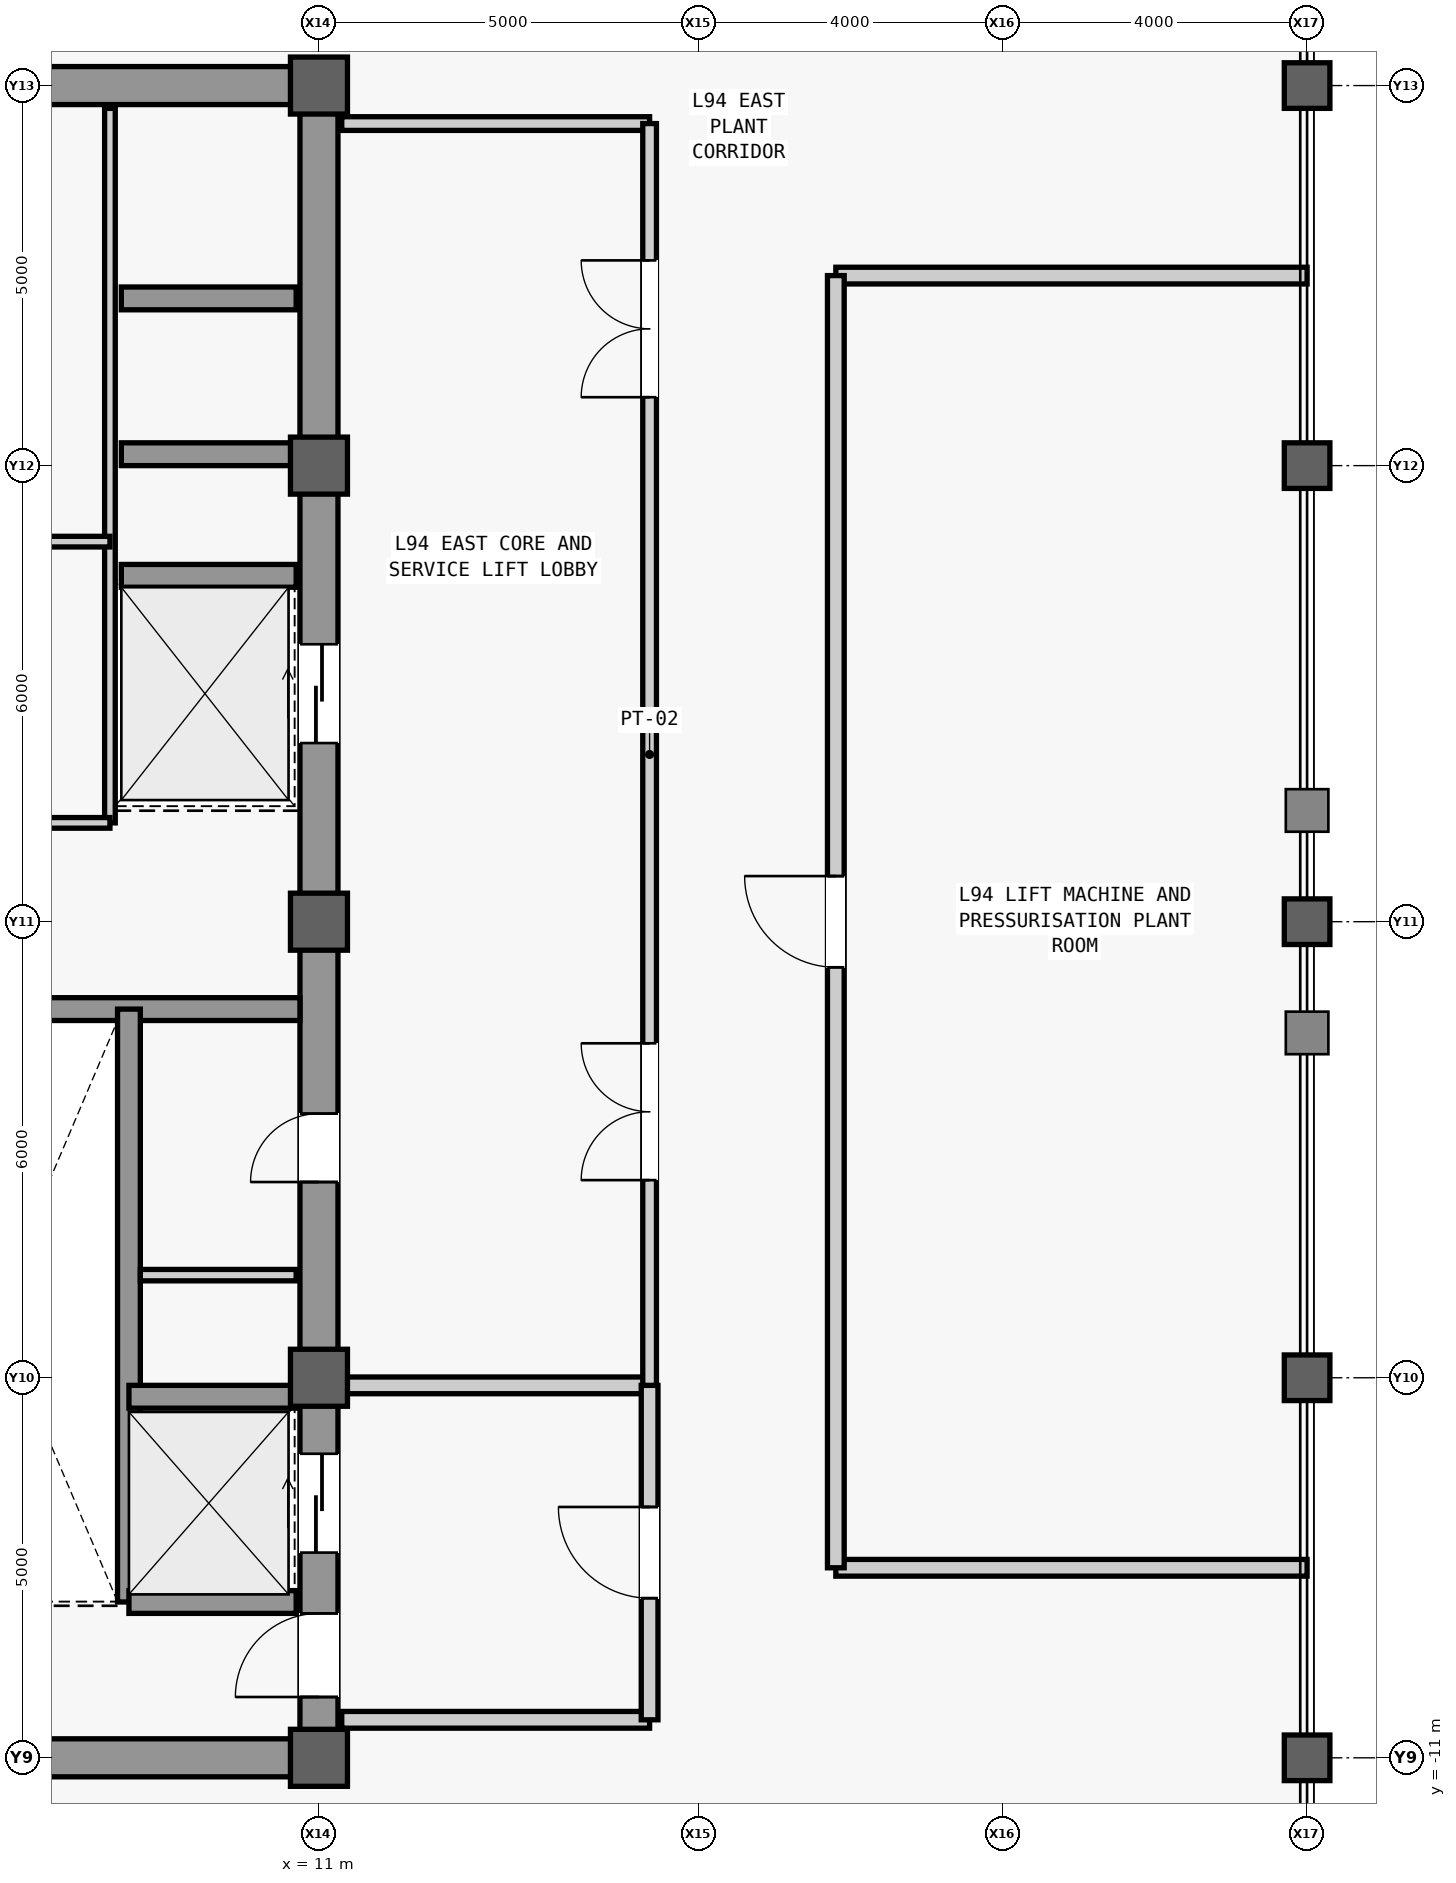
"""IFC4 building model, lengths in metres.
Left out: names, types, materials, properties, quantities, classifications, styles, units other than length and angle.
Written with IfcOpenShell. Run it as: python <this file> out.ifc"""

import sys

from ifc_helpers import new_model, si_unit, direction, frame, frame_2d, origin, origin_2d, place, context, subcontext, project, spatial, rectangle, hollow_rectangle, extrude, source, transform, mapped, element, fill, save


model = new_model("IFC4")
c1 = context("Model", 3, precision=1e-05, world=origin(), true_north=direction((0.0, 1.0)))
c2 = subcontext(c1, "Body", "Model", "MODEL_VIEW")
j1 = project(units=[si_unit("LENGTHUNIT", "METRE"), si_unit("PLANEANGLEUNIT", "RADIAN")], contexts=[c1])
p1 = place(None, origin())
s1 = spatial("IfcSite", under=j1, at=p1, CompositionType="ELEMENT")
p2 = place(p1, origin())
s2 = spatial("IfcBuilding", under=s1, at=p2, CompositionType="ELEMENT")
p3 = place(p2, frame((0.0, 0.0, 399.5)))
s3 = spatial("IfcBuildingStorey", under=s2, at=p3, CompositionType="ELEMENT", Elevation=399.5)
m1 = source(origin(), c2, "Body", "SweptSolid", [
    extrude(rectangle(XDim=22.0, YDim=0.5, at=frame_2d((11.0, 0.0))), origin(), (0.0, 0.0, 1.0), 4.5),
])
p4 = place(p3, frame((11.0, -11.0, 0.0), z_axis=(0.0, 0.0, 1.0), x_axis=(0.0, 1.0, 0.0)))
e1 = element("IfcWall", 1, at=p4, inside=s3, PredefinedType="SHEAR", context=c2, shape_type="MappedRepresentation", body=[
    mapped(m1, transform((0.0, 0.0, 0.0), scale=1.0)),
])
m2 = source(origin(), c2, "Body", "SweptSolid", [
    extrude(rectangle(XDim=1.1, YDim=2.2, at=frame_2d((0.55, 1.1))), frame((0.0, 0.26, 0.0), z_axis=(0.0, -1.0, 0.0), x_axis=(1.0, 0.0, 0.0)), (0.0, 0.0, 1.0), 0.52),
])
p5 = place(p4, frame((0.8, 0.0, 0.0)))
e2 = element("IfcOpeningElement", 2, at=p5, cuts=e1, PredefinedType="OPENING", context=c2, shape_type="MappedRepresentation", body=[
    mapped(m2, transform((0.0, 0.0, 0.0), scale=1.0)),
])
m3 = source(origin(), c2, "Body", "SweptSolid", [
    extrude(rectangle(XDim=0.9, YDim=2.15, at=frame_2d((0.45, 1.075))), frame((0.0, 0.26, 0.0), z_axis=(0.0, -1.0, 0.0), x_axis=(1.0, 0.0, 0.0)), (0.0, 0.0, 1.0), 0.52),
])
p6 = place(p4, frame((7.575, 0.0, 0.0)))
e3 = element("IfcOpeningElement", 3, at=p6, cuts=e1, PredefinedType="OPENING", context=c2, shape_type="MappedRepresentation", body=[
    mapped(m3, transform((0.0, 0.0, 0.0), scale=1.0)),
])
m4 = source(origin(), c2, "Body", "SweptSolid", [
    extrude(rectangle(XDim=1.3, YDim=2.3, at=frame_2d((0.65, 1.15))), frame((0.0, 0.26, 0.0), z_axis=(0.0, -1.0, 0.0), x_axis=(1.0, 0.0, 0.0)), (0.0, 0.0, 1.0), 0.52),
])
p7 = place(p4, frame((2.7, 0.0, 0.0)))
e4 = element("IfcOpeningElement", 4, at=p7, cuts=e1, PredefinedType="OPENING", context=c2, shape_type="MappedRepresentation", body=[
    mapped(m4, transform((0.0, 0.0, 0.0), scale=1.0)),
])
p8 = place(p4, frame((13.35, 0.0, 0.0)))
e5 = element("IfcOpeningElement", 5, at=p8, cuts=e1, PredefinedType="OPENING", context=c2, shape_type="MappedRepresentation", body=[
    mapped(m4, transform((0.0, 0.0, 0.0), scale=1.0)),
])
m5 = source(origin(), c2, "Body", "SweptSolid", [
    extrude(rectangle(XDim=5.9, YDim=0.5, at=frame_2d((2.95, 0.0))), origin(), (0.0, 0.0, 1.0), 4.5),
])
p9 = place(p3, frame((4.85, -11.0, 0.0), z_axis=(0.0, 0.0, 1.0), x_axis=(1.0, 0.0, 0.0)))
e6 = element("IfcWall", 6, at=p9, inside=s3, PredefinedType="SHEAR", context=c2, shape_type="MappedRepresentation", body=[
    mapped(m5, transform((0.0, 0.0, 0.0), scale=1.0)),
])
p10 = place(p3, frame((4.85, 11.0, 0.0), z_axis=(0.0, 0.0, 1.0), x_axis=(1.0, 0.0, 0.0)))
e7 = element("IfcWall", 7, at=p10, inside=s3, PredefinedType="SHEAR", context=c2, shape_type="MappedRepresentation", body=[
    mapped(m5, transform((0.0, 0.0, 0.0), scale=1.0)),
])
p11 = place(p10, frame((0.5, 0.0, 0.0)))
e8 = element("IfcOpeningElement", 8, at=p11, cuts=e7, PredefinedType="OPENING", context=c2, shape_type="MappedRepresentation", body=[
    mapped(m3, transform((0.0, 0.0, 0.0), scale=1.0)),
])
m6 = source(origin(), c2, "Body", "SweptSolid", [
    extrude(rectangle(XDim=5.65, YDim=0.3, at=frame_2d((2.825, 0.0))), origin(), (0.0, 0.0, 1.0), 4.5),
])
p12 = place(p3, frame((5.1, -1.15, 0.0), z_axis=(0.0, 0.0, 1.0), x_axis=(1.0, 0.0, 0.0)))
e9 = element("IfcWall", 9, at=p12, inside=s3, PredefinedType="SHEAR", context=c2, shape_type="MappedRepresentation", body=[
    mapped(m6, transform((0.0, 0.0, 0.0), scale=1.0)),
])
m7 = source(origin(), c2, "Body", "SweptSolid", [
    extrude(rectangle(XDim=0.75, YDim=0.75, at=origin_2d()), origin(), (0.0, 0.0, 1.0), 4.8),
])
for number, where, z_axis, x_axis in (
    (10, (11.0, -11.0, 0.0), (0.0, 0.0, 1.0), (1.0, 0.0, 0.0)),
    (11, (11.0, -6.0, 0.0), (0.0, 0.0, 1.0), (1.0, 0.0, 0.0)),
    (12, (11.0, 0.0, 0.0), (0.0, 0.0, 1.0), (1.0, 0.0, 0.0)),
    (13, (11.0, 6.0, 0.0), (0.0, 0.0, 1.0), (1.0, 0.0, 0.0)),
    (14, (11.0, 11.0, 0.0), (0.0, 0.0, 1.0), (1.0, 0.0, 0.0)),
):
    element("IfcColumn", number, at=place(p3, frame(where, z_axis=z_axis, x_axis=x_axis)), inside=s3, PredefinedType="COLUMN", context=c2, shape_type="MappedRepresentation", body=[
        mapped(m7, transform((0.0, 0.0, 0.0), scale=1.0)),
    ])
m8 = source(origin(), c2, "Body", "SweptSolid", [
    extrude(hollow_rectangle(XDim=0.6, YDim=0.6, WallThickness=0.035, at=origin_2d()), origin(), (0.0, 0.0, 1.0), 4.8),
])
for number, where, z_axis, x_axis in (
    (15, (24.0, -11.0, 0.0), (0.0, 0.0, 1.0), (1.0, 0.0, 0.0)),
    (16, (24.0, -6.0, 0.0), (0.0, 0.0, 1.0), (1.0, 0.0, 0.0)),
    (17, (24.0, 0.0, 0.0), (0.0, 0.0, 1.0), (1.0, 0.0, 0.0)),
    (18, (24.0, 6.0, 0.0), (0.0, 0.0, 1.0), (1.0, 0.0, 0.0)),
    (19, (24.0, 11.0, 0.0), (0.0, 0.0, 1.0), (1.0, 0.0, 0.0)),
):
    element("IfcColumn", number, at=place(p3, frame(where, z_axis=z_axis, x_axis=x_axis)), inside=s3, PredefinedType="COLUMN", context=c2, shape_type="MappedRepresentation", body=[
        mapped(m8, transform((0.0, 0.0, 0.0), scale=1.0)),
    ])
m9 = source(origin(), c2, "Body", "SweptSolid", [
    extrude(rectangle(XDim=7.8, YDim=0.3, at=frame_2d((3.9, 0.0))), origin(), (0.0, 0.0, 1.0), 4.5),
])
p13 = place(p3, frame((8.5, -8.95, 0.0), z_axis=(0.0, 0.0, 1.0), x_axis=(0.0, 1.0, 0.0)))
e20 = element("IfcWall", 20, at=p13, inside=s3, PredefinedType="SHEAR", context=c2, shape_type="MappedRepresentation", body=[
    mapped(m9, transform((0.0, 0.0, 0.0), scale=1.0)),
])
m10 = source(origin(), c2, "Body", "SweptSolid", [
    extrude(rectangle(XDim=2.2, YDim=0.3, at=frame_2d((1.1, 0.0))), origin(), (0.0, 0.0, 1.0), 4.5),
])
for number, where, z_axis, x_axis in (
    (21, (8.5, -8.95, 0.0), (0.0, 0.0, 1.0), (1.0, 0.0, 0.0)),
    (22, (8.5, -6.25, 0.0), (0.0, 0.0, 1.0), (1.0, 0.0, 0.0)),
):
    element("IfcWall", number, at=place(p3, frame(where, z_axis=z_axis, x_axis=x_axis)), inside=s3, PredefinedType="SHEAR", context=c2, shape_type="MappedRepresentation", body=[
        mapped(m10, transform((0.0, 0.0, 0.0), scale=1.0)),
    ])
m11 = source(origin(), c2, "Body", "SweptSolid", [
    extrude(rectangle(XDim=2.3, YDim=0.3, at=frame_2d((1.15, 0.0))), origin(), (0.0, 0.0, 1.0), 4.5),
])
for number, where, z_axis, x_axis in (
    (23, (8.4, 4.55, 0.0), (0.0, 0.0, 1.0), (1.0, 0.0, 0.0)),
    (24, (8.4, 6.15, 0.0), (0.0, 0.0, 1.0), (1.0, 0.0, 0.0)),
    (25, (8.4, 8.2, 0.0), (0.0, 0.0, 1.0), (1.0, 0.0, 0.0)),
):
    element("IfcWall", number, at=place(p3, frame(where, z_axis=z_axis, x_axis=x_axis)), inside=s3, PredefinedType="SHEAR", context=c2, shape_type="MappedRepresentation", body=[
        mapped(m11, transform((0.0, 0.0, 0.0), scale=1.0)),
    ])
m12 = source(origin(), c2, "Body", "SweptSolid", [
    extrude(rectangle(XDim=2.05, YDim=0.15, at=frame_2d((1.025, 0.0))), origin(), (0.0, 0.0, 1.0), 4.5),
])
p14 = place(p3, frame((8.65, -4.65, 0.0), z_axis=(0.0, 0.0, 1.0), x_axis=(1.0, 0.0, 0.0)))
e26 = element("IfcWall", 26, at=p14, inside=s3, PredefinedType="PARTITIONING", context=c2, shape_type="MappedRepresentation", body=[
    mapped(m12, transform((0.0, 0.0, 0.0), scale=1.0)),
])
m13 = source(origin(), c2, "Body", "SweptSolid", [
    extrude(rectangle(XDim=9.4, YDim=0.14, at=frame_2d((4.7, 0.0))), origin(), (0.0, 0.0, 1.0), 4.5),
])
p15 = place(p3, frame((8.25, 1.3, 0.0), z_axis=(0.0, 0.0, 1.0), x_axis=(0.0, 1.0, 0.0)))
e27 = element("IfcWall", 27, at=p15, inside=s3, PredefinedType="PARTITIONING", context=c2, shape_type="MappedRepresentation", body=[
    mapped(m13, transform((0.0, 0.0, 0.0), scale=1.0)),
])
m14 = source(origin(), c2, "Body", "SweptSolid", [
    extrude(rectangle(XDim=3.15, YDim=0.14, at=frame_2d((1.575, 0.0))), origin(), (0.0, 0.0, 1.0), 4.5),
])
p16 = place(p3, frame((5.1, 1.3, 0.0), z_axis=(0.0, 0.0, 1.0), x_axis=(1.0, 0.0, 0.0)))
e28 = element("IfcWall", 28, at=p16, inside=s3, PredefinedType="PARTITIONING", context=c2, shape_type="MappedRepresentation", body=[
    mapped(m14, transform((0.0, 0.0, 0.0), scale=1.0)),
])
p17 = place(p3, frame((5.1, 5.0, 0.0), z_axis=(0.0, 0.0, 1.0), x_axis=(1.0, 0.0, 0.0)))
e29 = element("IfcWall", 29, at=p17, inside=s3, PredefinedType="PARTITIONING", context=c2, shape_type="MappedRepresentation", body=[
    mapped(m14, transform((0.0, 0.0, 0.0), scale=1.0)),
])
m15 = source(origin(), c2, "Body", "SweptSolid", [
    extrude(rectangle(XDim=0.9, YDim=2.15, at=frame_2d((0.45, 1.075))), frame((0.0, 0.08, 0.0), z_axis=(0.0, -1.0, 0.0), x_axis=(1.0, 0.0, 0.0)), (0.0, 0.0, 1.0), 0.16),
])
p18 = place(p17, frame((0.25, 0.0, 0.0)))
e30 = element("IfcOpeningElement", 30, at=p18, cuts=e29, PredefinedType="OPENING", context=c2, shape_type="MappedRepresentation", body=[
    mapped(m15, transform((0.0, 0.0, 0.0), scale=1.0)),
])
m16 = source(origin(), c2, "Body", "SweptSolid", [
    extrude(rectangle(XDim=4.05, YDim=0.22, at=frame_2d((2.025, 0.0))), origin(), (0.0, 0.0, 1.0), 4.5),
])
p19 = place(p3, frame((11.3, -10.5, 0.0), z_axis=(0.0, 0.0, 1.0), x_axis=(1.0, 0.0, 0.0)))
e31 = element("IfcWall", 31, at=p19, inside=s3, PredefinedType="PARTITIONING", context=c2, shape_type="MappedRepresentation", body=[
    mapped(m16, transform((0.0, 0.0, 0.0), scale=1.0)),
])
m17 = source(origin(), c2, "Body", "SweptSolid", [
    extrude(rectangle(XDim=4.05, YDim=0.22, at=frame_2d((2.025, 0.0))), origin(), (0.0, 0.0, 1.0), 3.951),
])
p20 = place(p3, frame((11.3, -6.1, 0.0), z_axis=(0.0, 0.0, 1.0), x_axis=(1.0, 0.0, 0.0)))
e32 = element("IfcWall", 32, at=p20, inside=s3, PredefinedType="PARTITIONING", context=c2, shape_type="MappedRepresentation", body=[
    mapped(m17, transform((0.0, 0.0, 0.0), scale=1.0)),
])
m18 = source(origin(), c2, "Body", "SweptSolid", [
    extrude(rectangle(XDim=4.4, YDim=0.22, at=frame_2d((2.2, 0.0))), origin(), (0.0, 0.0, 1.0), 4.5),
])
p21 = place(p3, frame((15.35, -10.5, 0.0), z_axis=(0.0, 0.0, 1.0), x_axis=(0.0, 1.0, 0.0)))
e33 = element("IfcWall", 33, at=p21, inside=s3, PredefinedType="PARTITIONING", context=c2, shape_type="MappedRepresentation", body=[
    mapped(m18, transform((0.0, 0.0, 0.0), scale=1.0)),
])
m19 = source(origin(), c2, "Body", "SweptSolid", [
    extrude(rectangle(XDim=1.2, YDim=2.2, at=frame_2d((0.6, 1.1))), frame((0.0, 0.12, 0.0), z_axis=(0.0, -1.0, 0.0), x_axis=(1.0, 0.0, 0.0)), (0.0, 0.0, 1.0), 0.24),
])
p22 = place(p21, frame((1.6, 0.0, 0.0)))
e34 = element("IfcOpeningElement", 34, at=p22, cuts=e33, PredefinedType="OPENING", context=c2, shape_type="MappedRepresentation", body=[
    mapped(m19, transform((0.0, 0.0, 0.0), scale=1.0)),
])
m20 = source(origin(), c2, "Body", "SweptSolid", [
    extrude(rectangle(XDim=4.05, YDim=0.18, at=frame_2d((2.025, 0.0))), origin(), (0.0, 0.0, 1.0), 4.5),
])
p23 = place(p3, frame((11.3, 10.5, 0.0), z_axis=(0.0, 0.0, 1.0), x_axis=(1.0, 0.0, 0.0)))
e35 = element("IfcWall", 35, at=p23, inside=s3, PredefinedType="PARTITIONING", context=c2, shape_type="MappedRepresentation", body=[
    mapped(m20, transform((0.0, 0.0, 0.0), scale=1.0)),
])
m21 = source(origin(), c2, "Body", "SweptSolid", [
    extrude(rectangle(XDim=16.6, YDim=0.18, at=frame_2d((8.3, 0.0))), origin(), (0.0, 0.0, 1.0), 4.5),
])
p24 = place(p3, frame((15.35, -6.1, 0.0), z_axis=(0.0, 0.0, 1.0), x_axis=(0.0, 1.0, 0.0)))
e36 = element("IfcWall", 36, at=p24, inside=s3, PredefinedType="PARTITIONING", context=c2, shape_type="MappedRepresentation", body=[
    mapped(m21, transform((0.0, 0.0, 0.0), scale=1.0)),
])
m22 = source(origin(), c2, "Body", "SweptSolid", [
    extrude(rectangle(XDim=1.8, YDim=2.25, at=frame_2d((0.9, 1.125))), frame((0.0, 0.1, 0.0), z_axis=(0.0, -1.0, 0.0), x_axis=(1.0, 0.0, 0.0)), (0.0, 0.0, 1.0), 0.2),
])
p25 = place(p24, frame((2.7, 0.0, 0.0)))
e37 = element("IfcOpeningElement", 37, at=p25, cuts=e36, PredefinedType="OPENING", context=c2, shape_type="MappedRepresentation", body=[
    mapped(m22, transform((0.0, 0.0, 0.0), scale=1.0)),
])
p26 = place(p24, frame((13.0, 0.0, 0.0)))
e38 = element("IfcOpeningElement", 38, at=p26, cuts=e36, PredefinedType="OPENING", context=c2, shape_type="MappedRepresentation", body=[
    mapped(m22, transform((0.0, 0.0, 0.0), scale=1.0)),
])
m23 = source(origin(), c2, "Body", "SweptSolid", [
    extrude(rectangle(XDim=6.2, YDim=0.22, at=frame_2d((3.1, 0.0))), origin(), (0.0, 0.0, 1.0), 4.5),
])
for number, where, z_axis, x_axis in (
    (39, (17.8, -8.5, 0.0), (0.0, 0.0, 1.0), (1.0, 0.0, 0.0)),
    (40, (17.8, 8.5, 0.0), (0.0, 0.0, 1.0), (1.0, 0.0, 0.0)),
):
    element("IfcWall", number, at=place(p3, frame(where, z_axis=z_axis, x_axis=x_axis)), inside=s3, PredefinedType="PARTITIONING", context=c2, shape_type="MappedRepresentation", body=[
        mapped(m23, transform((0.0, 0.0, 0.0), scale=1.0)),
    ])
m24 = source(origin(), c2, "Body", "SweptSolid", [
    extrude(rectangle(XDim=17.0, YDim=0.22, at=frame_2d((8.5, 0.0))), origin(), (0.0, 0.0, 1.0), 4.5),
])
p27 = place(p3, frame((17.8, -8.5, 0.0), z_axis=(0.0, 0.0, 1.0), x_axis=(0.0, 1.0, 0.0)))
e41 = element("IfcWall", 41, at=p27, inside=s3, PredefinedType="PARTITIONING", context=c2, shape_type="MappedRepresentation", body=[
    mapped(m24, transform((0.0, 0.0, 0.0), scale=1.0)),
])
p28 = place(p27, frame((7.9, 0.0, 0.0)))
e42 = element("IfcOpeningElement", 42, at=p28, cuts=e41, PredefinedType="OPENING", context=c2, shape_type="MappedRepresentation", body=[
    mapped(m19, transform((0.0, 0.0, 0.0), scale=1.0)),
])
m25 = source(origin(), c2, "Body", "SweptSolid", [
    extrude(rectangle(XDim=1.1, YDim=2.2, at=frame_2d((0.55, 1.1))), frame((0.0, 0.025, 0.0), z_axis=(0.0, -1.0, 0.0), x_axis=(1.0, 0.0, 0.0)), (0.0, 0.0, 1.0), 0.05),
])
p29 = place(p5, origin())
e43 = element("IfcDoor", 43, at=p29, inside=s3, OperationType="SINGLE_SWING_LEFT", PredefinedType="DOOR", context=c2, shape_type="MappedRepresentation", body=[
    mapped(m25, transform((0.0, 0.0, 0.0), scale=1.0)),
])
fill(e2, e43)
m26 = source(origin(), c2, "Body", "SweptSolid", [
    extrude(rectangle(XDim=0.9, YDim=2.15, at=frame_2d((0.45, 1.075))), frame((0.0, 0.025, 0.0), z_axis=(0.0, -1.0, 0.0), x_axis=(1.0, 0.0, 0.0)), (0.0, 0.0, 1.0), 0.05),
])
p30 = place(p6, origin())
e44 = element("IfcDoor", 44, at=p30, inside=s3, OperationType="SINGLE_SWING_LEFT", PredefinedType="DOOR", context=c2, shape_type="MappedRepresentation", body=[
    mapped(m26, transform((0.0, 0.0, 0.0), scale=1.0)),
])
fill(e3, e44)
m27 = source(origin(), c2, "Body", "SweptSolid", [
    extrude(rectangle(XDim=1.2, YDim=2.2, at=frame_2d((0.6, 1.1))), frame((0.0, 0.025, 0.0), z_axis=(0.0, -1.0, 0.0), x_axis=(1.0, 0.0, 0.0)), (0.0, 0.0, 1.0), 0.05),
])
p31 = place(p22, origin())
e45 = element("IfcDoor", 45, at=p31, inside=s3, OperationType="SINGLE_SWING_RIGHT", PredefinedType="DOOR", context=c2, shape_type="MappedRepresentation", body=[
    mapped(m27, transform((0.0, 0.0, 0.0), scale=1.0)),
])
fill(e34, e45)
m28 = source(origin(), c2, "Body", "SweptSolid", [
    extrude(rectangle(XDim=1.8, YDim=2.25, at=frame_2d((0.9, 1.125))), frame((0.0, 0.025, 0.0), z_axis=(0.0, -1.0, 0.0), x_axis=(1.0, 0.0, 0.0)), (0.0, 0.0, 1.0), 0.05),
])
p32 = place(p25, origin())
e46 = element("IfcDoor", 46, at=p32, inside=s3, OperationType="SINGLE_SWING_RIGHT", PredefinedType="DOOR", context=c2, shape_type="MappedRepresentation", body=[
    mapped(m28, transform((0.0, 0.0, 0.0), scale=1.0)),
])
fill(e37, e46)
p33 = place(p26, origin())
e47 = element("IfcDoor", 47, at=p33, inside=s3, OperationType="SINGLE_SWING_LEFT", PredefinedType="DOOR", context=c2, shape_type="MappedRepresentation", body=[
    mapped(m28, transform((0.0, 0.0, 0.0), scale=1.0)),
])
fill(e38, e47)
p34 = place(p28, origin())
e48 = element("IfcDoor", 48, at=p34, inside=s3, OperationType="SINGLE_SWING_RIGHT", PredefinedType="DOOR", context=c2, shape_type="MappedRepresentation", body=[
    mapped(m27, transform((0.0, 0.0, 0.0), scale=1.0)),
])
fill(e42, e48)
m29 = source(origin(), c2, "Body", "SweptSolid", [
    extrude(rectangle(XDim=1.3, YDim=2.3, at=frame_2d((0.65, 1.15))), frame((0.0, 0.025, 0.0), z_axis=(0.0, -1.0, 0.0), x_axis=(1.0, 0.0, 0.0)), (0.0, 0.0, 1.0), 0.05),
])
p35 = place(p7, origin())
e49 = element("IfcDoor", 49, at=p35, inside=s3, OperationType="SLIDING_TO_LEFT", PredefinedType="DOOR", context=c2, shape_type="MappedRepresentation", body=[
    mapped(m29, transform((0.0, 0.0, 0.0), scale=1.0)),
])
fill(e4, e49)
p36 = place(p8, origin())
e50 = element("IfcDoor", 50, at=p36, inside=s3, OperationType="SLIDING_TO_LEFT", PredefinedType="DOOR", context=c2, shape_type="MappedRepresentation", body=[
    mapped(m29, transform((0.0, 0.0, 0.0), scale=1.0)),
])
fill(e5, e50)
save(model, sys.argv[1])
